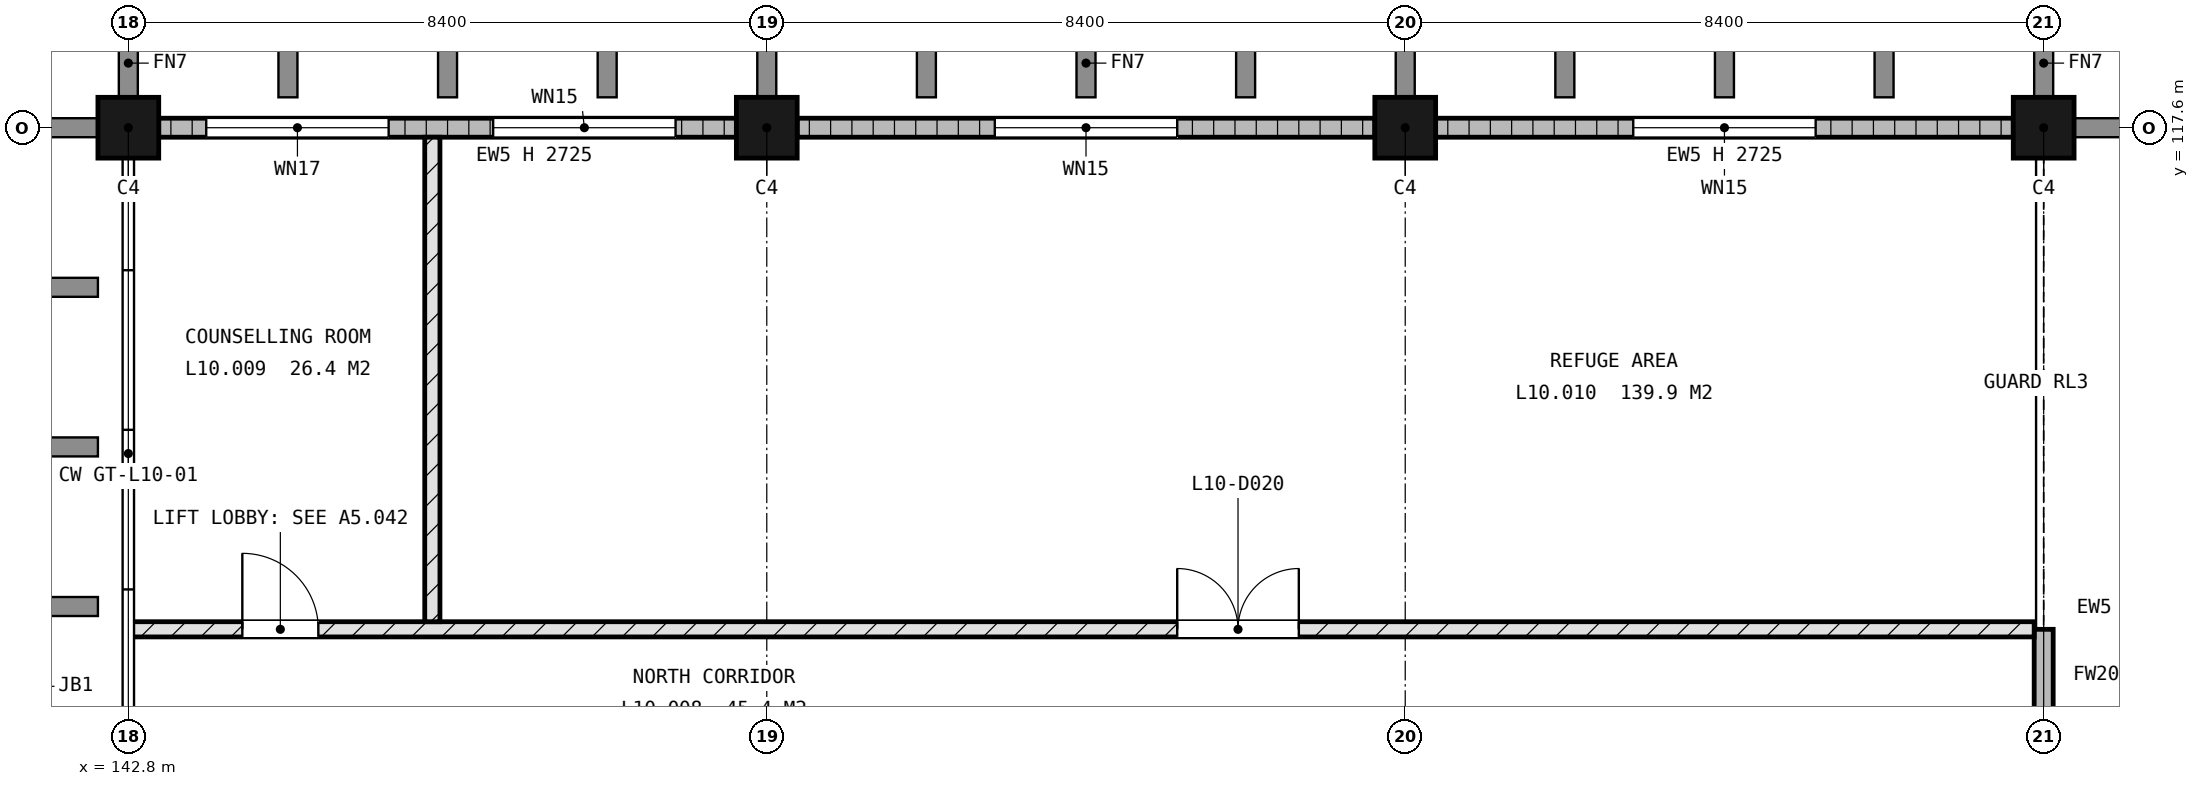
"""IFC4 building model, lengths in metres.
Left out: names, types, materials, properties, quantities, classifications, styles, units other than length and angle.
Written with IfcOpenShell. Run it as: python <this file> out.ifc"""

import sys

from ifc_helpers import new_model, si_unit, direction, frame, frame_2d, origin, origin_2d, place, context, subcontext, project, spatial, rectangle, extrude, element, fill, save


model = new_model("IFC4")
c1 = context("Model", 3, precision=1e-05, world=origin(), true_north=direction((0.0, 1.0)))
c2 = subcontext(c1, "Body", "Model", "MODEL_VIEW")
j1 = project(units=[si_unit("LENGTHUNIT", "METRE"), si_unit("PLANEANGLEUNIT", "RADIAN")], contexts=[c1])
p1 = place(None, origin())
s1 = spatial("IfcSite", under=j1, at=p1, CompositionType="ELEMENT")
p2 = place(p1, origin())
s2 = spatial("IfcBuilding", under=s1, at=p2, CompositionType="ELEMENT")
p3 = place(p2, frame((0.0, 0.0, 39.6)))
s3 = spatial("IfcBuildingStorey", under=s2, at=p3, CompositionType="ELEMENT", Elevation=39.6)
for number, where, z_axis, x_axis in (
    (1, (142.8, 117.6, -0.225), (0.0, 0.0, 1.0), (1.0, 0.0, 0.0)),
    (2, (151.2, 117.6, -0.225), (0.0, 0.0, 1.0), (1.0, 0.0, 0.0)),
    (3, (159.6, 117.6, -0.225), (0.0, 0.0, 1.0), (1.0, 0.0, 0.0)),
    (4, (168.0, 117.6, -0.225), (0.0, 0.0, 1.0), (1.0, 0.0, 0.0)),
):
    element("IfcColumn", number, at=place(p3, frame(where, z_axis=z_axis, x_axis=x_axis)), inside=s3, PredefinedType="COLUMN", context=c2, shape_type="SweptSolid", body=[
        extrude(rectangle(XDim=0.8, YDim=0.8, at=origin_2d()), origin(), (0.0, 0.0, 1.0), 3.6),
    ])
p4 = place(p3, frame((143.2, 117.6, 0.0), z_axis=(0.0, 0.0, 1.0), x_axis=(1.0, 0.0, 0.0)))
e5 = element("IfcWall", 5, at=p4, inside=s3, PredefinedType="STANDARD", context=c2, shape_type="SweptSolid", body=[
    extrude(rectangle(XDim=7.6, YDim=0.25, at=frame_2d((3.8, 0.0))), origin(), (0.0, 0.0, 1.0), 2.725),
])
p5 = place(p4, frame((0.625, 0.0, 0.9)))
e6 = element("IfcOpeningElement", 6, at=p5, cuts=e5, PredefinedType="OPENING", context=c2, shape_type="SweptSolid", body=[
    extrude(rectangle(XDim=2.4, YDim=1.5, at=frame_2d((1.2, 0.75))), frame((0.0, 0.135, 0.0), z_axis=(0.0, -1.0, 0.0), x_axis=(1.0, 0.0, 0.0)), (0.0, 0.0, 1.0), 0.27),
])
p6 = place(p4, frame((4.4, 0.0, 0.9)))
e7 = element("IfcOpeningElement", 7, at=p6, cuts=e5, PredefinedType="OPENING", context=c2, shape_type="SweptSolid", body=[
    extrude(rectangle(XDim=2.4, YDim=1.5, at=frame_2d((1.2, 0.75))), frame((0.0, 0.135, 0.0), z_axis=(0.0, -1.0, 0.0), x_axis=(1.0, 0.0, 0.0)), (0.0, 0.0, 1.0), 0.27),
])
p7 = place(p3, frame((151.6, 117.6, 0.0), z_axis=(0.0, 0.0, 1.0), x_axis=(1.0, 0.0, 0.0)))
e8 = element("IfcWall", 8, at=p7, inside=s3, PredefinedType="STANDARD", context=c2, shape_type="SweptSolid", body=[
    extrude(rectangle(XDim=7.6, YDim=0.25, at=frame_2d((3.8, 0.0))), origin(), (0.0, 0.0, 1.0), 2.725),
])
p8 = place(p7, frame((2.6, 0.0, 0.9)))
e9 = element("IfcOpeningElement", 9, at=p8, cuts=e8, PredefinedType="OPENING", context=c2, shape_type="SweptSolid", body=[
    extrude(rectangle(XDim=2.4, YDim=1.5, at=frame_2d((1.2, 0.75))), frame((0.0, 0.135, 0.0), z_axis=(0.0, -1.0, 0.0), x_axis=(1.0, 0.0, 0.0)), (0.0, 0.0, 1.0), 0.27),
])
p9 = place(p3, frame((160.0, 117.6, 0.0), z_axis=(0.0, 0.0, 1.0), x_axis=(1.0, 0.0, 0.0)))
e10 = element("IfcWall", 10, at=p9, inside=s3, PredefinedType="STANDARD", context=c2, shape_type="SweptSolid", body=[
    extrude(rectangle(XDim=7.6, YDim=0.25, at=frame_2d((3.8, 0.0))), origin(), (0.0, 0.0, 1.0), 2.725),
])
p10 = place(p9, frame((2.6, 0.0, 0.9)))
e11 = element("IfcOpeningElement", 11, at=p10, cuts=e10, PredefinedType="OPENING", context=c2, shape_type="SweptSolid", body=[
    extrude(rectangle(XDim=2.4, YDim=1.5, at=frame_2d((1.2, 0.75))), frame((0.0, 0.135, 0.0), z_axis=(0.0, -1.0, 0.0), x_axis=(1.0, 0.0, 0.0)), (0.0, 0.0, 1.0), 0.27),
])
p11 = place(p3, frame((168.0, 109.4, 0.0), z_axis=(0.0, 0.0, 1.0), x_axis=(0.0, 1.0, 0.0)))
e12 = element("IfcWall", 12, at=p11, inside=s3, PredefinedType="STANDARD", context=c2, shape_type="SweptSolid", body=[
    extrude(rectangle(XDim=1.6, YDim=0.25, at=frame_2d((0.8, 0.0))), origin(), (0.0, 0.0, 1.0), 3.3),
])
p12 = place(p3, frame((142.8, 111.0, 0.0), z_axis=(0.0, 0.0, 1.0), x_axis=(1.0, 0.0, 0.0)))
e13 = element("IfcWall", 13, at=p12, inside=s3, PredefinedType="SOLIDWALL", context=c2, shape_type="SweptSolid", body=[
    extrude(rectangle(XDim=25.075, YDim=0.2, at=frame_2d((12.538, 0.0))), origin(), (0.0, 0.0, 1.0), 3.3),
])
p13 = place(p12, frame((1.5, 0.0, 0.0)))
e14 = element("IfcOpeningElement", 14, at=p13, cuts=e13, PredefinedType="OPENING", context=c2, shape_type="SweptSolid", body=[
    extrude(rectangle(XDim=1.0, YDim=2.1, at=frame_2d((0.5, 1.05))), frame((0.0, 0.11, 0.0), z_axis=(0.0, -1.0, 0.0), x_axis=(1.0, 0.0, 0.0)), (0.0, 0.0, 1.0), 0.22),
])
p14 = place(p12, frame((13.8, 0.0, 0.0)))
e15 = element("IfcOpeningElement", 15, at=p14, cuts=e13, PredefinedType="OPENING", context=c2, shape_type="SweptSolid", body=[
    extrude(rectangle(XDim=1.6, YDim=2.25, at=frame_2d((0.8, 1.125))), frame((0.0, 0.11, 0.0), z_axis=(0.0, -1.0, 0.0), x_axis=(1.0, 0.0, 0.0)), (0.0, 0.0, 1.0), 0.22),
])
p15 = place(p3, frame((146.8, 111.1, 0.0), z_axis=(0.0, 0.0, 1.0), x_axis=(0.0, 1.0, 0.0)))
e16 = element("IfcWall", 16, at=p15, inside=s3, PredefinedType="SOLIDWALL", context=c2, shape_type="SweptSolid", body=[
    extrude(rectangle(XDim=6.375, YDim=0.2, at=frame_2d((3.188, 0.0))), origin(), (0.0, 0.0, 1.0), 3.3),
])
p16 = place(p5, origin())
e17 = element("IfcWindow", 17, at=p16, inside=s3, PartitioningType="SINGLE_PANEL", PredefinedType="WINDOW", context=c2, shape_type="SweptSolid", body=[
    extrude(rectangle(XDim=2.4, YDim=1.5, at=frame_2d((1.2, 0.75))), frame((0.0, 0.03, 0.0), z_axis=(0.0, -1.0, 0.0), x_axis=(1.0, 0.0, 0.0)), (0.0, 0.0, 1.0), 0.06),
])
fill(e6, e17)
p17 = place(p6, origin())
e18 = element("IfcWindow", 18, at=p17, inside=s3, PartitioningType="SINGLE_PANEL", PredefinedType="WINDOW", context=c2, shape_type="SweptSolid", body=[
    extrude(rectangle(XDim=2.4, YDim=1.5, at=frame_2d((1.2, 0.75))), frame((0.0, 0.03, 0.0), z_axis=(0.0, -1.0, 0.0), x_axis=(1.0, 0.0, 0.0)), (0.0, 0.0, 1.0), 0.06),
])
fill(e7, e18)
p18 = place(p8, origin())
e19 = element("IfcWindow", 19, at=p18, inside=s3, PartitioningType="SINGLE_PANEL", PredefinedType="WINDOW", context=c2, shape_type="SweptSolid", body=[
    extrude(rectangle(XDim=2.4, YDim=1.5, at=frame_2d((1.2, 0.75))), frame((0.0, 0.03, 0.0), z_axis=(0.0, -1.0, 0.0), x_axis=(1.0, 0.0, 0.0)), (0.0, 0.0, 1.0), 0.06),
])
fill(e9, e19)
p19 = place(p10, origin())
e20 = element("IfcWindow", 20, at=p19, inside=s3, PartitioningType="SINGLE_PANEL", PredefinedType="WINDOW", context=c2, shape_type="SweptSolid", body=[
    extrude(rectangle(XDim=2.4, YDim=1.5, at=frame_2d((1.2, 0.75))), frame((0.0, 0.03, 0.0), z_axis=(0.0, -1.0, 0.0), x_axis=(1.0, 0.0, 0.0)), (0.0, 0.0, 1.0), 0.06),
])
fill(e11, e20)
p20 = place(p13, origin())
e21 = element("IfcDoor", 21, at=p20, inside=s3, OperationType="SINGLE_SWING_RIGHT", PredefinedType="DOOR", context=c2, shape_type="SweptSolid", body=[
    extrude(rectangle(XDim=1.0, YDim=2.1, at=frame_2d((0.5, 1.05))), frame((0.0, 0.025, 0.0), z_axis=(0.0, -1.0, 0.0), x_axis=(1.0, 0.0, 0.0)), (0.0, 0.0, 1.0), 0.05),
])
fill(e14, e21)
p21 = place(p14, origin())
e22 = element("IfcDoor", 22, at=p21, inside=s3, OperationType="DOUBLE_DOOR_SINGLE_SWING", PredefinedType="DOOR", context=c2, shape_type="SweptSolid", body=[
    extrude(rectangle(XDim=1.6, YDim=2.25, at=frame_2d((0.8, 1.125))), frame((0.0, 0.025, 0.0), z_axis=(0.0, -1.0, 0.0), x_axis=(1.0, 0.0, 0.0)), (0.0, 0.0, 1.0), 0.05),
])
fill(e15, e22)
save(model, sys.argv[1])
